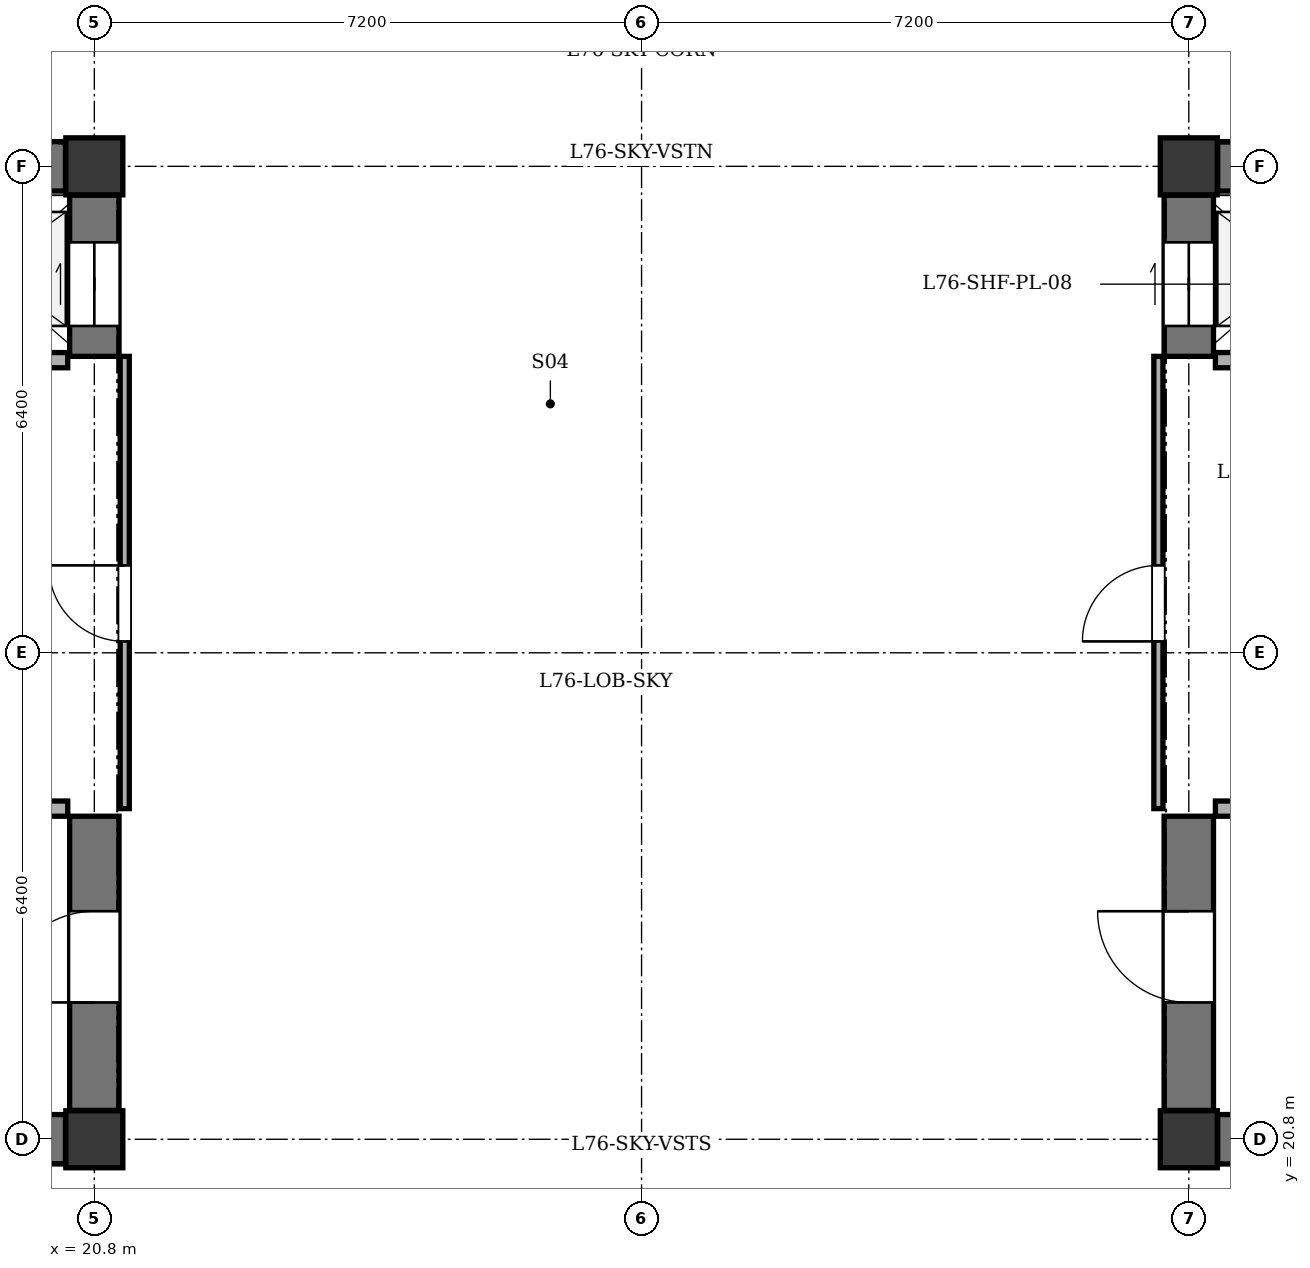
"""IFC4 building model, lengths in metres.
Left out: names, types, materials, properties, quantities, classifications, styles, units other than length and angle.
Written with IfcOpenShell. Run it as: python <this file> out.ifc"""

import sys

from ifc_helpers import new_model, si_unit, direction, frame, frame_2d, origin, origin_2d, place, context, subcontext, project, spatial, rectangle, extrude, element, fill, save


model = new_model("IFC4")
c1 = context("Model", 3, precision=1e-05, world=origin(), true_north=direction((0.0, 1.0)))
c2 = subcontext(c1, "Body", "Model", "MODEL_VIEW")
j1 = project(units=[si_unit("LENGTHUNIT", "METRE"), si_unit("PLANEANGLEUNIT", "RADIAN")], contexts=[c1])
p1 = place(None, origin())
s1 = spatial("IfcSite", under=j1, at=p1, CompositionType="ELEMENT")
p2 = place(p1, origin())
s2 = spatial("IfcBuilding", under=s1, at=p2, CompositionType="ELEMENT")
p3 = place(p2, frame((0.0, 0.0, 287.4)))
s3 = spatial("IfcBuildingStorey", under=s2, at=p3, CompositionType="ELEMENT", Elevation=287.4)
for number, where, z_axis, x_axis in (
    (1, (20.8, 20.8, 0.0), (0.0, 0.0, 1.0), (1.0, 0.0, 0.0)),
    (2, (20.8, 33.6, 0.0), (0.0, 0.0, 1.0), (1.0, 0.0, 0.0)),
    (3, (35.2, 20.8, 0.0), (0.0, 0.0, 1.0), (1.0, 0.0, 0.0)),
    (4, (35.2, 33.6, 0.0), (0.0, 0.0, 1.0), (1.0, 0.0, 0.0)),
):
    element("IfcColumn", number, at=place(p3, frame(where, z_axis=z_axis, x_axis=x_axis)), inside=s3, PredefinedType="COLUMN", context=c2, shape_type="SweptSolid", body=[
        extrude(rectangle(XDim=0.75, YDim=0.75, at=origin_2d()), origin(), (0.0, 0.0, 1.0), 4.8),
    ])
p4 = place(p3, frame((13.18, 20.8, 0.0), z_axis=(0.0, 0.0, 1.0), x_axis=(1.0, 0.0, 0.0)))
e5 = element("IfcWall", 5, at=p4, inside=s3, PredefinedType="SHEAR", context=c2, shape_type="SweptSolid", body=[
    extrude(rectangle(XDim=7.24, YDim=0.65, at=frame_2d((3.62, 0.0))), origin(), (0.0, 0.0, 1.0), 4.35),
])
p5 = place(p3, frame((13.18, 33.6, 0.0), z_axis=(0.0, 0.0, 1.0), x_axis=(1.0, 0.0, 0.0)))
e6 = element("IfcWall", 6, at=p5, inside=s3, PredefinedType="SHEAR", context=c2, shape_type="SweptSolid", body=[
    extrude(rectangle(XDim=7.24, YDim=0.65, at=frame_2d((3.62, 0.0))), origin(), (0.0, 0.0, 1.0), 4.35),
])
p6 = place(p5, frame((2.19, 0.0, 0.0)))
e7 = element("IfcOpeningElement", 7, at=p6, cuts=e6, PredefinedType="OPENING", context=c2, shape_type="SweptSolid", body=[
    extrude(rectangle(XDim=0.85, YDim=2.02, at=frame_2d((0.425, 1.01))), frame((0.0, 0.335, 0.0), z_axis=(0.0, -1.0, 0.0), x_axis=(1.0, 0.0, 0.0)), (0.0, 0.0, 1.0), 0.67),
])
p7 = place(p3, frame((20.8, 21.18, 0.0), z_axis=(0.0, 0.0, 1.0), x_axis=(0.0, 1.0, 0.0)))
e8 = element("IfcWall", 8, at=p7, inside=s3, PredefinedType="SHEAR", context=c2, shape_type="SweptSolid", body=[
    extrude(rectangle(XDim=3.87, YDim=0.65, at=frame_2d((1.935, 0.0))), origin(), (0.0, 0.0, 1.0), 4.35),
])
p8 = place(p7, frame((1.42, 0.0, 0.0)))
e9 = element("IfcOpeningElement", 9, at=p8, cuts=e8, PredefinedType="OPENING", context=c2, shape_type="SweptSolid", body=[
    extrude(rectangle(XDim=1.2, YDim=2.15, at=frame_2d((0.6, 1.075))), frame((0.0, 0.335, 0.0), z_axis=(0.0, -1.0, 0.0), x_axis=(1.0, 0.0, 0.0)), (0.0, 0.0, 1.0), 0.67),
])
p9 = place(p3, frame((20.8, 31.1, 0.0), z_axis=(0.0, 0.0, 1.0), x_axis=(0.0, 1.0, 0.0)))
e10 = element("IfcWall", 10, at=p9, inside=s3, PredefinedType="SHEAR", context=c2, shape_type="SweptSolid", body=[
    extrude(rectangle(XDim=2.12, YDim=0.65, at=frame_2d((1.06, 0.0))), origin(), (0.0, 0.0, 1.0), 4.35),
])
p10 = place(p9, frame((0.4, 0.0, 0.0)))
e11 = element("IfcOpeningElement", 11, at=p10, cuts=e10, PredefinedType="OPENING", context=c2, shape_type="SweptSolid", body=[
    extrude(rectangle(XDim=1.1, YDim=2.1, at=frame_2d((0.55, 1.05))), frame((0.0, 0.335, 0.0), z_axis=(0.0, -1.0, 0.0), x_axis=(1.0, 0.0, 0.0)), (0.0, 0.0, 1.0), 0.67),
])
for number, where, z_axis, x_axis in (
    (12, (16.6, 25.15, 0.0), (0.0, 0.0, 1.0), (1.0, 0.0, 0.0)),
    (13, (16.6, 31.05, 0.0), (0.0, 0.0, 1.0), (1.0, 0.0, 0.0)),
):
    element("IfcWall", number, at=place(p3, frame(where, z_axis=z_axis, x_axis=x_axis)), inside=s3, PredefinedType="SOLIDWALL", context=c2, shape_type="SweptSolid", body=[
        extrude(rectangle(XDim=3.85, YDim=0.2, at=frame_2d((1.925, 0.0))), origin(), (0.0, 0.0, 1.0), 4.35),
    ])
p11 = place(p3, frame((35.58, 20.8, 0.0), z_axis=(0.0, 0.0, 1.0), x_axis=(1.0, 0.0, 0.0)))
e14 = element("IfcWall", 14, at=p11, inside=s3, PredefinedType="SHEAR", context=c2, shape_type="SweptSolid", body=[
    extrude(rectangle(XDim=7.24, YDim=0.65, at=frame_2d((3.62, 0.0))), origin(), (0.0, 0.0, 1.0), 4.35),
])
p12 = place(p3, frame((35.58, 33.6, 0.0), z_axis=(0.0, 0.0, 1.0), x_axis=(1.0, 0.0, 0.0)))
e15 = element("IfcWall", 15, at=p12, inside=s3, PredefinedType="SHEAR", context=c2, shape_type="SweptSolid", body=[
    extrude(rectangle(XDim=7.24, YDim=0.65, at=frame_2d((3.62, 0.0))), origin(), (0.0, 0.0, 1.0), 4.35),
])
p13 = place(p12, frame((4.82, 0.0, 0.0)))
e16 = element("IfcOpeningElement", 16, at=p13, cuts=e15, PredefinedType="OPENING", context=c2, shape_type="SweptSolid", body=[
    extrude(rectangle(XDim=1.3, YDim=2.15, at=frame_2d((0.65, 1.075))), frame((0.0, 0.335, 0.0), z_axis=(0.0, -1.0, 0.0), x_axis=(1.0, 0.0, 0.0)), (0.0, 0.0, 1.0), 0.67),
])
p14 = place(p12, frame((2.62, 0.0, 0.0)))
e17 = element("IfcOpeningElement", 17, at=p14, cuts=e15, PredefinedType="OPENING", context=c2, shape_type="SweptSolid", body=[
    extrude(rectangle(XDim=0.85, YDim=2.02, at=frame_2d((0.425, 1.01))), frame((0.0, 0.335, 0.0), z_axis=(0.0, -1.0, 0.0), x_axis=(1.0, 0.0, 0.0)), (0.0, 0.0, 1.0), 0.67),
])
p15 = place(p3, frame((35.2, 21.18, 0.0), z_axis=(0.0, 0.0, 1.0), x_axis=(0.0, 1.0, 0.0)))
e18 = element("IfcWall", 18, at=p15, inside=s3, PredefinedType="SHEAR", context=c2, shape_type="SweptSolid", body=[
    extrude(rectangle(XDim=3.87, YDim=0.65, at=frame_2d((1.935, 0.0))), origin(), (0.0, 0.0, 1.0), 4.35),
])
p16 = place(p15, frame((1.42, 0.0, 0.0)))
e19 = element("IfcOpeningElement", 19, at=p16, cuts=e18, PredefinedType="OPENING", context=c2, shape_type="SweptSolid", body=[
    extrude(rectangle(XDim=1.2, YDim=2.15, at=frame_2d((0.6, 1.075))), frame((0.0, 0.335, 0.0), z_axis=(0.0, -1.0, 0.0), x_axis=(1.0, 0.0, 0.0)), (0.0, 0.0, 1.0), 0.67),
])
p17 = place(p3, frame((35.2, 31.1, 0.0), z_axis=(0.0, 0.0, 1.0), x_axis=(0.0, 1.0, 0.0)))
e20 = element("IfcWall", 20, at=p17, inside=s3, PredefinedType="SHEAR", context=c2, shape_type="SweptSolid", body=[
    extrude(rectangle(XDim=2.12, YDim=0.65, at=frame_2d((1.06, 0.0))), origin(), (0.0, 0.0, 1.0), 4.35),
])
p18 = place(p17, frame((0.4, 0.0, 0.0)))
e21 = element("IfcOpeningElement", 21, at=p18, cuts=e20, PredefinedType="OPENING", context=c2, shape_type="SweptSolid", body=[
    extrude(rectangle(XDim=1.1, YDim=2.1, at=frame_2d((0.55, 1.05))), frame((0.0, 0.335, 0.0), z_axis=(0.0, -1.0, 0.0), x_axis=(1.0, 0.0, 0.0)), (0.0, 0.0, 1.0), 0.67),
])
p19 = place(p3, frame((35.55, 25.15, 0.0), z_axis=(0.0, 0.0, 1.0), x_axis=(1.0, 0.0, 0.0)))
e22 = element("IfcWall", 22, at=p19, inside=s3, PredefinedType="SOLIDWALL", context=c2, shape_type="SweptSolid", body=[
    extrude(rectangle(XDim=3.85, YDim=0.2, at=frame_2d((1.925, 0.0))), origin(), (0.0, 0.0, 1.0), 4.35),
])
p20 = place(p3, frame((35.55, 31.05, 0.0), z_axis=(0.0, 0.0, 1.0), x_axis=(1.0, 0.0, 0.0)))
e23 = element("IfcWall", 23, at=p20, inside=s3, PredefinedType="SOLIDWALL", context=c2, shape_type="SweptSolid", body=[
    extrude(rectangle(XDim=2.25, YDim=0.2, at=frame_2d((1.125, 0.0))), origin(), (0.0, 0.0, 1.0), 4.35),
])
p21 = place(p3, frame((21.2, 25.15, 0.0), z_axis=(0.0, 0.0, 1.0), x_axis=(0.0, 1.0, 0.0)))
e24 = element("IfcWall", 24, at=p21, inside=s3, PredefinedType="PARTITIONING", context=c2, shape_type="SweptSolid", body=[
    extrude(rectangle(XDim=5.95, YDim=0.12, at=frame_2d((2.975, 0.0))), origin(), (0.0, 0.0, 1.0), 4.35),
])
p22 = place(p21, frame((2.2, 0.0, 0.0)))
e25 = element("IfcOpeningElement", 25, at=p22, cuts=e24, PredefinedType="OPENING", context=c2, shape_type="SweptSolid", body=[
    extrude(rectangle(XDim=1.0, YDim=2.1, at=frame_2d((0.5, 1.05))), frame((0.0, 0.07, 0.0), z_axis=(0.0, -1.0, 0.0), x_axis=(1.0, 0.0, 0.0)), (0.0, 0.0, 1.0), 0.14),
])
p23 = place(p3, frame((34.8, 25.15, 0.0), z_axis=(0.0, 0.0, 1.0), x_axis=(0.0, 1.0, 0.0)))
e26 = element("IfcWall", 26, at=p23, inside=s3, PredefinedType="PARTITIONING", context=c2, shape_type="SweptSolid", body=[
    extrude(rectangle(XDim=5.95, YDim=0.12, at=frame_2d((2.975, 0.0))), origin(), (0.0, 0.0, 1.0), 4.35),
])
p24 = place(p23, frame((2.2, 0.0, 0.0)))
e27 = element("IfcOpeningElement", 27, at=p24, cuts=e26, PredefinedType="OPENING", context=c2, shape_type="SweptSolid", body=[
    extrude(rectangle(XDim=1.0, YDim=2.1, at=frame_2d((0.5, 1.05))), frame((0.0, 0.07, 0.0), z_axis=(0.0, -1.0, 0.0), x_axis=(1.0, 0.0, 0.0)), (0.0, 0.0, 1.0), 0.14),
])
p25 = place(p8, origin())
e28 = element("IfcDoor", 28, at=p25, inside=s3, OperationType="SINGLE_SWING_LEFT", PredefinedType="DOOR", context=c2, shape_type="SweptSolid", body=[
    extrude(rectangle(XDim=1.2, YDim=2.15, at=frame_2d((0.6, 1.075))), frame((0.0, 0.025, 0.0), z_axis=(0.0, -1.0, 0.0), x_axis=(1.0, 0.0, 0.0)), (0.0, 0.0, 1.0), 0.05),
])
fill(e9, e28)
p26 = place(p10, origin())
e29 = element("IfcDoor", 29, at=p26, inside=s3, OperationType="DOUBLE_DOOR_SLIDING", PredefinedType="DOOR", context=c2, shape_type="SweptSolid", body=[
    extrude(rectangle(XDim=1.1, YDim=2.1, at=frame_2d((0.55, 1.05))), frame((0.0, 0.025, 0.0), z_axis=(0.0, -1.0, 0.0), x_axis=(1.0, 0.0, 0.0)), (0.0, 0.0, 1.0), 0.05),
])
fill(e11, e29)
p27 = place(p16, origin())
e30 = element("IfcDoor", 30, at=p27, inside=s3, OperationType="SINGLE_SWING_RIGHT", PredefinedType="DOOR", context=c2, shape_type="SweptSolid", body=[
    extrude(rectangle(XDim=1.2, YDim=2.15, at=frame_2d((0.6, 1.075))), frame((0.0, 0.025, 0.0), z_axis=(0.0, -1.0, 0.0), x_axis=(1.0, 0.0, 0.0)), (0.0, 0.0, 1.0), 0.05),
])
fill(e19, e30)
p28 = place(p18, origin())
e31 = element("IfcDoor", 31, at=p28, inside=s3, OperationType="DOUBLE_DOOR_SLIDING", PredefinedType="DOOR", context=c2, shape_type="SweptSolid", body=[
    extrude(rectangle(XDim=1.1, YDim=2.1, at=frame_2d((0.55, 1.05))), frame((0.0, 0.025, 0.0), z_axis=(0.0, -1.0, 0.0), x_axis=(1.0, 0.0, 0.0)), (0.0, 0.0, 1.0), 0.05),
])
fill(e21, e31)
p29 = place(p22, origin())
e32 = element("IfcDoor", 32, at=p29, inside=s3, OperationType="SINGLE_SWING_RIGHT", PredefinedType="DOOR", context=c2, shape_type="SweptSolid", body=[
    extrude(rectangle(XDim=1.0, YDim=2.1, at=frame_2d((0.5, 1.05))), frame((0.0, 0.025, 0.0), z_axis=(0.0, -1.0, 0.0), x_axis=(1.0, 0.0, 0.0)), (0.0, 0.0, 1.0), 0.05),
])
fill(e25, e32)
p30 = place(p24, origin())
e33 = element("IfcDoor", 33, at=p30, inside=s3, OperationType="SINGLE_SWING_LEFT", PredefinedType="DOOR", context=c2, shape_type="SweptSolid", body=[
    extrude(rectangle(XDim=1.0, YDim=2.1, at=frame_2d((0.5, 1.05))), frame((0.0, 0.025, 0.0), z_axis=(0.0, -1.0, 0.0), x_axis=(1.0, 0.0, 0.0)), (0.0, 0.0, 1.0), 0.05),
])
fill(e27, e33)
save(model, sys.argv[1])
